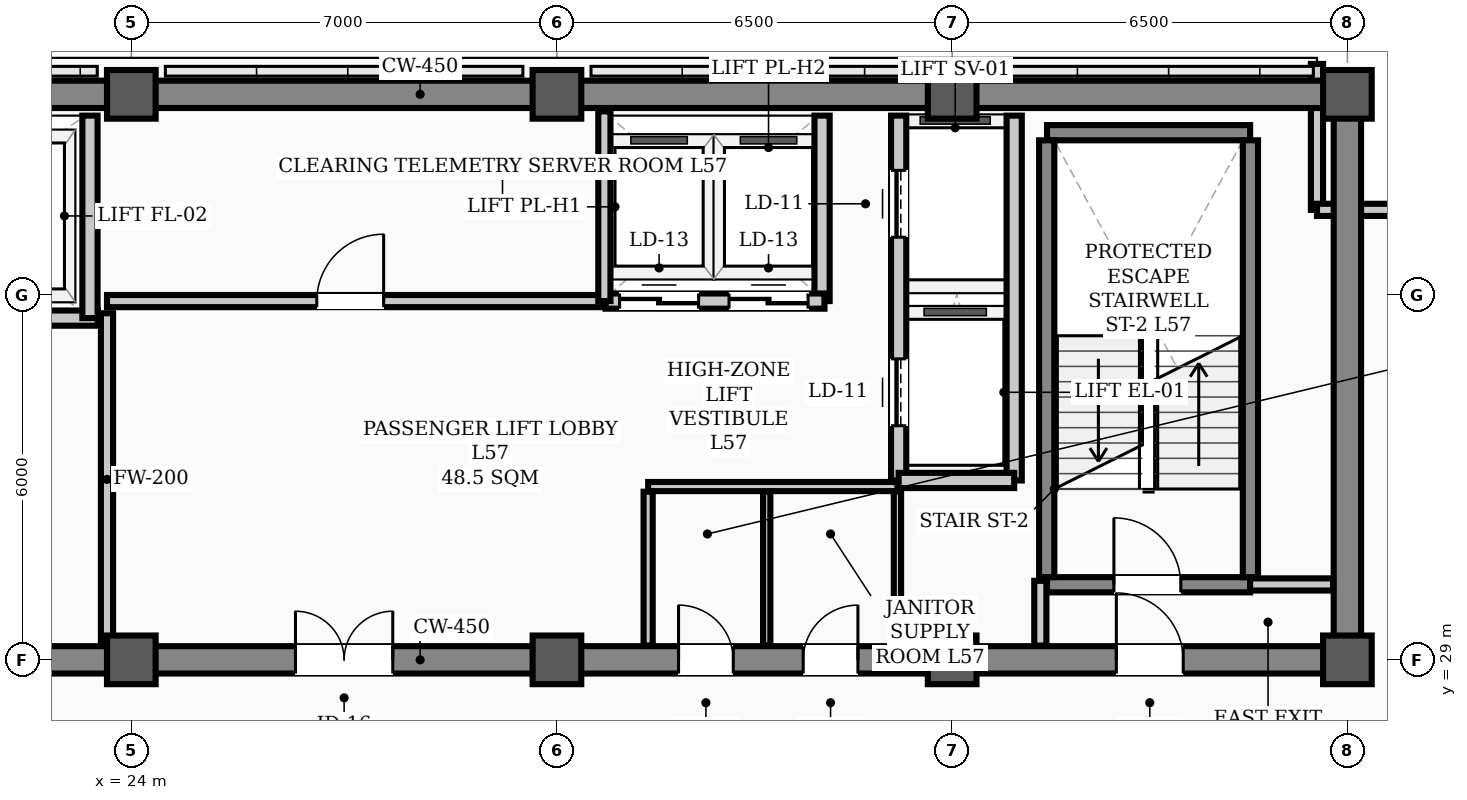
"""IFC4 building model, lengths in metres.
Left out: names, types, materials, properties, quantities, classifications, styles, units other than length and angle.
Written with IfcOpenShell. Run it as: python <this file> out.ifc"""

import sys

from ifc_helpers import new_model, si_unit, direction, frame, frame_2d, origin, origin_2d, place, context, subcontext, project, spatial, rectangle, hollow_rectangle, extrude, element, fill, save


model = new_model("IFC4")
c1 = context("Model", 3, precision=1e-05, world=origin(), true_north=direction((0.0, 1.0)))
c2 = subcontext(c1, "Body", "Model", "MODEL_VIEW")
j1 = project(units=[si_unit("LENGTHUNIT", "METRE"), si_unit("PLANEANGLEUNIT", "RADIAN")], contexts=[c1])
p1 = place(None, origin())
s1 = spatial("IfcSite", under=j1, at=p1, CompositionType="ELEMENT")
p2 = place(p1, origin())
s2 = spatial("IfcBuilding", under=s1, at=p2, CompositionType="ELEMENT")
p3 = place(p2, frame((0.0, 0.0, 230.6)))
s3 = spatial("IfcBuildingStorey", under=s2, at=p3, CompositionType="ELEMENT", Elevation=230.6)
for number, where, z_axis, x_axis in (
    (1, (24.0, 29.0, 0.0), (0.0, 0.0, 1.0), (1.0, 0.0, 0.0)),
    (2, (24.0, 38.3, 0.0), (0.0, 0.0, 1.0), (1.0, 0.0, 0.0)),
    (3, (31.0, 29.0, 0.0), (0.0, 0.0, 1.0), (1.0, 0.0, 0.0)),
    (4, (31.0, 38.3, 0.0), (0.0, 0.0, 1.0), (1.0, 0.0, 0.0)),
    (5, (37.5, 29.0, 0.0), (0.0, 0.0, 1.0), (1.0, 0.0, 0.0)),
    (6, (37.5, 38.3, 0.0), (0.0, 0.0, 1.0), (1.0, 0.0, 0.0)),
    (7, (44.0, 29.0, 0.0), (0.0, 0.0, 1.0), (1.0, 0.0, 0.0)),
    (8, (44.0, 38.3, 0.0), (0.0, 0.0, 1.0), (1.0, 0.0, 0.0)),
):
    element("IfcColumn", number, at=place(p3, frame(where, z_axis=z_axis, x_axis=x_axis)), inside=s3, PredefinedType="COLUMN", context=c2, shape_type="SweptSolid", body=[
        extrude(hollow_rectangle(XDim=0.8, YDim=0.8, WallThickness=0.032, InnerFilletRadius=0.016, OuterFilletRadius=0.048, at=origin_2d()), origin(), (0.0, 0.0, 1.0), 3.9),
    ])
p4 = place(p3, frame((43.5, 38.8, 0.0), z_axis=(0.0, 0.0, 1.0), x_axis=(0.0, -1.0, 0.0)))
e9 = element("IfcWall", 9, at=p4, inside=s3, PredefinedType="PARAPET", context=c2, shape_type="SweptSolid", body=[
    extrude(rectangle(XDim=2.4, YDim=0.2, at=frame_2d((1.2, 0.0))), origin(), (0.0, 0.0, 1.0), 1.2),
])
p5 = place(p3, frame((43.5, 36.4, 0.0), z_axis=(0.0, 0.0, 1.0), x_axis=(1.0, 0.0, 0.0)))
e10 = element("IfcWall", 10, at=p5, inside=s3, PredefinedType="PARAPET", context=c2, shape_type="SweptSolid", body=[
    extrude(rectangle(XDim=2.4, YDim=0.2, at=frame_2d((1.2, 0.0))), origin(), (0.0, 0.0, 1.0), 1.2),
])
p6 = place(p3, frame((13.5, 29.0, 0.0), z_axis=(0.0, 0.0, 1.0), x_axis=(1.0, 0.0, 0.0)))
e11 = element("IfcWall", 11, at=p6, inside=s3, PredefinedType="SHEAR", context=c2, shape_type="SweptSolid", body=[
    extrude(rectangle(XDim=30.5, YDim=0.45, at=frame_2d((15.25, 0.0))), origin(), (0.0, 0.0, 1.0), 3.72),
])
p7 = place(p6, frame((1.75, 0.0, 0.0)))
e12 = element("IfcOpeningElement", 12, at=p7, cuts=e11, PredefinedType="OPENING", context=c2, shape_type="SweptSolid", body=[
    extrude(rectangle(XDim=1.1, YDim=2.08, at=frame_2d((0.55, 1.04))), frame((0.0, 0.235, 0.0), z_axis=(0.0, -1.0, 0.0), x_axis=(1.0, 0.0, 0.0)), (0.0, 0.0, 1.0), 0.47),
])
p8 = place(p6, frame((26.7, 0.0, 0.0)))
e13 = element("IfcOpeningElement", 13, at=p8, cuts=e11, PredefinedType="OPENING", context=c2, shape_type="SweptSolid", body=[
    extrude(rectangle(XDim=1.1, YDim=2.08, at=frame_2d((0.55, 1.04))), frame((0.0, 0.235, 0.0), z_axis=(0.0, -1.0, 0.0), x_axis=(1.0, 0.0, 0.0)), (0.0, 0.0, 1.0), 0.47),
])
p9 = place(p6, frame((6.8, 0.0, 0.0)))
e14 = element("IfcOpeningElement", 14, at=p9, cuts=e11, PredefinedType="OPENING", context=c2, shape_type="SweptSolid", body=[
    extrude(rectangle(XDim=1.1, YDim=2.08, at=frame_2d((0.55, 1.04))), frame((0.0, 0.235, 0.0), z_axis=(0.0, -1.0, 0.0), x_axis=(1.0, 0.0, 0.0)), (0.0, 0.0, 1.0), 0.47),
])
p10 = place(p6, frame((13.2, 0.0, 0.0)))
e15 = element("IfcOpeningElement", 15, at=p10, cuts=e11, PredefinedType="OPENING", context=c2, shape_type="SweptSolid", body=[
    extrude(rectangle(XDim=1.6, YDim=2.08, at=frame_2d((0.8, 1.04))), frame((0.0, 0.235, 0.0), z_axis=(0.0, -1.0, 0.0), x_axis=(1.0, 0.0, 0.0)), (0.0, 0.0, 1.0), 0.47),
])
p11 = place(p6, frame((19.5, 0.0, 0.0)))
e16 = element("IfcOpeningElement", 16, at=p11, cuts=e11, PredefinedType="OPENING", context=c2, shape_type="SweptSolid", body=[
    extrude(rectangle(XDim=0.9, YDim=2.08, at=frame_2d((0.45, 1.04))), frame((0.0, 0.235, 0.0), z_axis=(0.0, -1.0, 0.0), x_axis=(1.0, 0.0, 0.0)), (0.0, 0.0, 1.0), 0.47),
])
p12 = place(p6, frame((21.55, 0.0, 0.0)))
e17 = element("IfcOpeningElement", 17, at=p12, cuts=e11, PredefinedType="OPENING", context=c2, shape_type="SweptSolid", body=[
    extrude(rectangle(XDim=0.9, YDim=2.08, at=frame_2d((0.45, 1.04))), frame((0.0, 0.235, 0.0), z_axis=(0.0, -1.0, 0.0), x_axis=(1.0, 0.0, 0.0)), (0.0, 0.0, 1.0), 0.47),
])
p13 = place(p3, frame((13.5, 38.3, 0.0), z_axis=(0.0, 0.0, 1.0), x_axis=(1.0, 0.0, 0.0)))
e18 = element("IfcWall", 18, at=p13, inside=s3, PredefinedType="SHEAR", context=c2, shape_type="SweptSolid", body=[
    extrude(rectangle(XDim=30.5, YDim=0.45, at=frame_2d((15.25, 0.0))), origin(), (0.0, 0.0, 1.0), 3.72),
])
p14 = place(p3, frame((44.0, 29.35, 0.0), z_axis=(0.0, 0.0, 1.0), x_axis=(0.0, 1.0, 0.0)))
e19 = element("IfcWall", 19, at=p14, inside=s3, PredefinedType="SHEAR", context=c2, shape_type="SweptSolid", body=[
    extrude(rectangle(XDim=8.6, YDim=0.45, at=frame_2d((4.3, 0.0))), origin(), (0.0, 0.0, 1.0), 3.72),
])
p15 = place(p3, frame((39.06, 30.235, 0.0), z_axis=(0.0, 0.0, 1.0), x_axis=(1.0, 0.0, 0.0)))
e20 = element("IfcWall", 20, at=p15, inside=s3, PredefinedType="STANDARD", context=c2, shape_type="SweptSolid", body=[
    extrude(rectangle(XDim=3.34, YDim=0.25, at=frame_2d((1.67, 0.0))), origin(), (0.0, 0.0, 1.0), 3.72),
])
p16 = place(p15, frame((1.1, 0.0, 0.0)))
e21 = element("IfcOpeningElement", 21, at=p16, cuts=e20, PredefinedType="OPENING", context=c2, shape_type="SweptSolid", body=[
    extrude(rectangle(XDim=1.1, YDim=2.08, at=frame_2d((0.55, 1.04))), frame((0.0, 0.135, 0.0), z_axis=(0.0, -1.0, 0.0), x_axis=(1.0, 0.0, 0.0)), (0.0, 0.0, 1.0), 0.27),
])
p17 = place(p3, frame((39.06, 37.669, 0.0), z_axis=(0.0, 0.0, 1.0), x_axis=(1.0, 0.0, 0.0)))
e22 = element("IfcWall", 22, at=p17, inside=s3, PredefinedType="STANDARD", context=c2, shape_type="SweptSolid", body=[
    extrude(rectangle(XDim=3.34, YDim=0.25, at=frame_2d((1.67, 0.0))), origin(), (0.0, 0.0, 1.0), 3.72),
])
for number, where, z_axis, x_axis in (
    (23, (39.055, 30.36, 0.0), (0.0, 0.0, 1.0), (0.0, 1.0, 0.0)),
    (24, (42.405, 30.36, 0.0), (0.0, 0.0, 1.0), (0.0, 1.0, 0.0)),
):
    element("IfcWall", number, at=place(p3, frame(where, z_axis=z_axis, x_axis=x_axis)), inside=s3, PredefinedType="STANDARD", context=c2, shape_type="SweptSolid", body=[
        extrude(rectangle(XDim=7.184, YDim=0.25, at=frame_2d((3.592, 0.0))), origin(), (0.0, 0.0, 1.0), 3.72),
    ])
p18 = place(p3, frame((18.1, 34.62, 0.0), z_axis=(0.0, 0.0, 1.0), x_axis=(1.0, 0.0, 0.0)))
e25 = element("IfcWall", 25, at=p18, inside=s3, PredefinedType="STANDARD", context=c2, shape_type="SweptSolid", body=[
    extrude(rectangle(XDim=5.35, YDim=0.25, at=frame_2d((2.675, 0.0))), origin(), (0.0, 0.0, 1.0), 3.72),
])
p19 = place(p18, frame((0.85, 0.0, 0.0)))
e26 = element("IfcOpeningElement", 26, at=p19, cuts=e25, PredefinedType="OPENING", context=c2, shape_type="SweptSolid", body=[
    extrude(rectangle(XDim=1.1, YDim=2.08, at=frame_2d((0.55, 1.04))), frame((0.0, 0.135, 0.0), z_axis=(0.0, -1.0, 0.0), x_axis=(1.0, 0.0, 0.0)), (0.0, 0.0, 1.0), 0.27),
])
p20 = place(p18, frame((3.45, 0.0, 0.0)))
e27 = element("IfcOpeningElement", 27, at=p20, cuts=e25, PredefinedType="OPENING", context=c2, shape_type="SweptSolid", body=[
    extrude(rectangle(XDim=1.1, YDim=2.08, at=frame_2d((0.55, 1.04))), frame((0.0, 0.135, 0.0), z_axis=(0.0, -1.0, 0.0), x_axis=(1.0, 0.0, 0.0)), (0.0, 0.0, 1.0), 0.27),
])
p21 = place(p3, frame((36.62, 31.95, 0.0), z_axis=(0.0, 0.0, 1.0), x_axis=(0.0, 1.0, 0.0)))
e28 = element("IfcWall", 28, at=p21, inside=s3, PredefinedType="STANDARD", context=c2, shape_type="SweptSolid", body=[
    extrude(rectangle(XDim=6.0, YDim=0.25, at=frame_2d((3.0, 0.0))), origin(), (0.0, 0.0, 1.0), 3.72),
])
p22 = place(p21, frame((0.9, 0.0, 0.0)))
e29 = element("IfcOpeningElement", 29, at=p22, cuts=e28, PredefinedType="OPENING", context=c2, shape_type="SweptSolid", body=[
    extrude(rectangle(XDim=1.1, YDim=2.08, at=frame_2d((0.55, 1.04))), frame((0.0, 0.135, 0.0), z_axis=(0.0, -1.0, 0.0), x_axis=(1.0, 0.0, 0.0)), (0.0, 0.0, 1.0), 0.27),
])
p23 = place(p21, frame((4.0, 0.0, 0.0)))
e30 = element("IfcOpeningElement", 30, at=p23, cuts=e28, PredefinedType="OPENING", context=c2, shape_type="SweptSolid", body=[
    extrude(rectangle(XDim=1.1, YDim=2.08, at=frame_2d((0.55, 1.04))), frame((0.0, 0.135, 0.0), z_axis=(0.0, -1.0, 0.0), x_axis=(1.0, 0.0, 0.0)), (0.0, 0.0, 1.0), 0.27),
])
p24 = place(p3, frame((38.52, 31.95, 0.0), z_axis=(0.0, 0.0, 1.0), x_axis=(0.0, 1.0, 0.0)))
e31 = element("IfcWall", 31, at=p24, inside=s3, PredefinedType="STANDARD", context=c2, shape_type="SweptSolid", body=[
    extrude(rectangle(XDim=6.0, YDim=0.25, at=frame_2d((3.0, 0.0))), origin(), (0.0, 0.0, 1.0), 3.48),
])
p25 = place(p3, frame((36.62, 31.95, 0.0), z_axis=(0.0, 0.0, 1.0), x_axis=(1.0, 0.0, 0.0)))
e32 = element("IfcWall", 32, at=p25, inside=s3, PredefinedType="STANDARD", context=c2, shape_type="SweptSolid", body=[
    extrude(rectangle(XDim=1.9, YDim=0.25, at=frame_2d((0.95, 0.0))), origin(), (0.0, 0.0, 1.0), 3.48),
])
p26 = place(p3, frame((23.32, 34.62, 0.0), z_axis=(0.0, 0.0, 1.0), x_axis=(0.0, 1.0, 0.0)))
e33 = element("IfcWall", 33, at=p26, inside=s3, PredefinedType="STANDARD", context=c2, shape_type="SweptSolid", body=[
    extrude(rectangle(XDim=3.33, YDim=0.25, at=frame_2d((1.665, 0.0))), origin(), (0.0, 0.0, 1.0), 3.72),
])
p27 = place(p3, frame((35.36, 34.9, 0.0), z_axis=(0.0, 0.0, 1.0), x_axis=(0.0, 1.0, 0.0)))
e34 = element("IfcWall", 34, at=p27, inside=s3, PredefinedType="STANDARD", context=c2, shape_type="SweptSolid", body=[
    extrude(rectangle(XDim=3.05, YDim=0.25, at=frame_2d((1.525, 0.0))), origin(), (0.0, 0.0, 1.0), 3.72),
])
p28 = place(p3, frame((31.8, 34.9, 0.0), z_axis=(0.0, 0.0, 1.0), x_axis=(1.0, 0.0, 0.0)))
e35 = element("IfcWall", 35, at=p28, inside=s3, PredefinedType="STANDARD", context=c2, shape_type="SweptSolid", body=[
    extrude(rectangle(XDim=3.6, YDim=0.25, at=frame_2d((1.8, 0.0))), origin(), (0.0, 0.0, 1.0), 3.72),
])
p29 = place(p28, frame((0.23, 0.0, 0.0)))
e36 = element("IfcOpeningElement", 36, at=p29, cuts=e35, PredefinedType="OPENING", context=c2, shape_type="SweptSolid", body=[
    extrude(rectangle(XDim=1.3, YDim=2.08, at=frame_2d((0.65, 1.04))), frame((0.0, 0.135, 0.0), z_axis=(0.0, -1.0, 0.0), x_axis=(1.0, 0.0, 0.0)), (0.0, 0.0, 1.0), 0.27),
])
p30 = place(p28, frame((2.03, 0.0, 0.0)))
e37 = element("IfcOpeningElement", 37, at=p30, cuts=e35, PredefinedType="OPENING", context=c2, shape_type="SweptSolid", body=[
    extrude(rectangle(XDim=1.3, YDim=2.08, at=frame_2d((0.65, 1.04))), frame((0.0, 0.135, 0.0), z_axis=(0.0, -1.0, 0.0), x_axis=(1.0, 0.0, 0.0)), (0.0, 0.0, 1.0), 0.27),
])
p31 = place(p3, frame((42.4, 30.24, 0.0), z_axis=(0.0, 0.0, 1.0), x_axis=(1.0, 0.0, 0.0)))
e38 = element("IfcWall", 38, at=p31, inside=s3, PredefinedType="STANDARD", context=c2, shape_type="SweptSolid", body=[
    extrude(rectangle(XDim=1.365, YDim=0.2, at=frame_2d((0.683, 0.0))), origin(), (0.0, 0.0, 1.0), 3.72),
])
p32 = place(p3, frame((23.6, 34.9, 0.0), z_axis=(0.0, 0.0, 1.0), x_axis=(1.0, 0.0, 0.0)))
e39 = element("IfcWall", 39, at=p32, inside=s3, PredefinedType="STANDARD", context=c2, shape_type="SweptSolid", body=[
    extrude(rectangle(XDim=8.18, YDim=0.2, at=frame_2d((4.09, 0.0))), origin(), (0.0, 0.0, 1.0), 3.72),
])
p33 = place(p32, frame((3.45, 0.0, 0.0)))
e40 = element("IfcOpeningElement", 40, at=p33, cuts=e39, PredefinedType="OPENING", context=c2, shape_type="SweptSolid", body=[
    extrude(rectangle(XDim=1.1, YDim=2.08, at=frame_2d((0.55, 1.04))), frame((0.0, 0.11, 0.0), z_axis=(0.0, -1.0, 0.0), x_axis=(1.0, 0.0, 0.0)), (0.0, 0.0, 1.0), 0.22),
])
p34 = place(p3, frame((32.5, 31.85, 0.0), z_axis=(0.0, 0.0, 1.0), x_axis=(1.0, 0.0, 0.0)))
e41 = element("IfcWall", 41, at=p34, inside=s3, PredefinedType="PARTITIONING", context=c2, shape_type="SweptSolid", body=[
    extrude(rectangle(XDim=4.1, YDim=0.15, at=frame_2d((2.05, 0.0))), origin(), (0.0, 0.0, 1.0), 3.72),
])
p35 = place(p3, frame((38.95, 29.235, 0.0), z_axis=(0.0, 0.0, 1.0), x_axis=(0.0, 1.0, 0.0)))
e42 = element("IfcWall", 42, at=p35, inside=s3, PredefinedType="STANDARD", context=c2, shape_type="SweptSolid", body=[
    extrude(rectangle(XDim=1.065, YDim=0.2, at=frame_2d((0.532, 0.0))), origin(), (0.0, 0.0, 1.0), 3.72),
])
p36 = place(p3, frame((23.6, 29.235, 0.0), z_axis=(0.0, 0.0, 1.0), x_axis=(0.0, 1.0, 0.0)))
e43 = element("IfcWall", 43, at=p36, inside=s3, PredefinedType="STANDARD", context=c2, shape_type="SweptSolid", body=[
    extrude(rectangle(XDim=5.465, YDim=0.2, at=frame_2d((2.732, 0.0))), origin(), (0.0, 0.0, 1.0), 3.2),
])
p37 = place(p3, frame((32.5, 29.235, 0.0), z_axis=(0.0, 0.0, 1.0), x_axis=(0.0, 1.0, 0.0)))
e44 = element("IfcWall", 44, at=p37, inside=s3, PredefinedType="PARTITIONING", context=c2, shape_type="SweptSolid", body=[
    extrude(rectangle(XDim=2.53, YDim=0.15, at=frame_2d((1.265, 0.0))), origin(), (0.0, 0.0, 1.0), 3.35),
])
for number, where, z_axis, x_axis in (
    (45, (36.6, 29.235, 0.0), (0.0, 0.0, 1.0), (0.0, 1.0, 0.0)),
    (46, (34.45, 29.235, 0.0), (0.0, 0.0, 1.0), (0.0, 1.0, 0.0)),
):
    element("IfcWall", number, at=place(p3, frame(where, z_axis=z_axis, x_axis=x_axis)), inside=s3, PredefinedType="PARTITIONING", context=c2, shape_type="SweptSolid", body=[
        extrude(rectangle(XDim=2.53, YDim=0.12, at=frame_2d((1.265, 0.0))), origin(), (0.0, 0.0, 1.0), 3.35),
    ])
p38 = place(p3, frame((31.78, 34.9, 0.0), z_axis=(0.0, 0.0, 1.0), x_axis=(0.0, 1.0, 0.0)))
e47 = element("IfcWall", 47, at=p38, inside=s3, PredefinedType="STANDARD", context=c2, shape_type="SweptSolid", body=[
    extrude(rectangle(XDim=3.12, YDim=0.2, at=frame_2d((1.56, 0.0))), origin(), (0.0, 0.0, 1.0), 3.72),
])
p39 = place(p16, origin())
e48 = element("IfcDoor", 48, at=p39, inside=s3, OperationType="SINGLE_SWING_LEFT", PredefinedType="DOOR", context=c2, shape_type="SweptSolid", body=[
    extrude(rectangle(XDim=1.1, YDim=2.08, at=frame_2d((0.55, 1.04))), frame((0.0, 0.025, 0.0), z_axis=(0.0, -1.0, 0.0), x_axis=(1.0, 0.0, 0.0)), (0.0, 0.0, 1.0), 0.05),
])
fill(e21, e48)
p40 = place(p8, origin())
e49 = element("IfcDoor", 49, at=p40, inside=s3, OperationType="SINGLE_SWING_LEFT", PredefinedType="DOOR", context=c2, shape_type="SweptSolid", body=[
    extrude(rectangle(XDim=1.1, YDim=2.08, at=frame_2d((0.55, 1.04))), frame((0.0, 0.025, 0.0), z_axis=(0.0, -1.0, 0.0), x_axis=(1.0, 0.0, 0.0)), (0.0, 0.0, 1.0), 0.05),
])
fill(e13, e49)
p41 = place(p10, origin())
e50 = element("IfcDoor", 50, at=p41, inside=s3, OperationType="DOUBLE_DOOR_SINGLE_SWING", PredefinedType="DOOR", context=c2, shape_type="SweptSolid", body=[
    extrude(rectangle(XDim=1.6, YDim=2.08, at=frame_2d((0.8, 1.04))), frame((0.0, 0.025, 0.0), z_axis=(0.0, -1.0, 0.0), x_axis=(1.0, 0.0, 0.0)), (0.0, 0.0, 1.0), 0.05),
])
fill(e15, e50)
p42 = place(p33, origin())
e51 = element("IfcDoor", 51, at=p42, inside=s3, OperationType="SINGLE_SWING_RIGHT", PredefinedType="DOOR", context=c2, shape_type="SweptSolid", body=[
    extrude(rectangle(XDim=1.1, YDim=2.08, at=frame_2d((0.55, 1.04))), frame((0.0, 0.025, 0.0), z_axis=(0.0, -1.0, 0.0), x_axis=(1.0, 0.0, 0.0)), (0.0, 0.0, 1.0), 0.05),
])
fill(e40, e51)
p43 = place(p11, origin())
e52 = element("IfcDoor", 52, at=p43, inside=s3, OperationType="SINGLE_SWING_LEFT", PredefinedType="DOOR", context=c2, shape_type="SweptSolid", body=[
    extrude(rectangle(XDim=0.9, YDim=2.08, at=frame_2d((0.45, 1.04))), frame((0.0, 0.025, 0.0), z_axis=(0.0, -1.0, 0.0), x_axis=(1.0, 0.0, 0.0)), (0.0, 0.0, 1.0), 0.05),
])
fill(e16, e52)
p44 = place(p12, origin())
e53 = element("IfcDoor", 53, at=p44, inside=s3, OperationType="SINGLE_SWING_RIGHT", PredefinedType="DOOR", context=c2, shape_type="SweptSolid", body=[
    extrude(rectangle(XDim=0.9, YDim=2.08, at=frame_2d((0.45, 1.04))), frame((0.0, 0.025, 0.0), z_axis=(0.0, -1.0, 0.0), x_axis=(1.0, 0.0, 0.0)), (0.0, 0.0, 1.0), 0.05),
])
fill(e17, e53)
p45 = place(p22, origin())
e54 = element("IfcDoor", 54, at=p45, inside=s3, OperationType="SLIDING_TO_LEFT", PredefinedType="DOOR", context=c2, shape_type="SweptSolid", body=[
    extrude(rectangle(XDim=1.1, YDim=2.08, at=frame_2d((0.55, 1.04))), frame((0.0, 0.025, 0.0), z_axis=(0.0, -1.0, 0.0), x_axis=(1.0, 0.0, 0.0)), (0.0, 0.0, 1.0), 0.05),
])
fill(e29, e54)
p46 = place(p23, origin())
e55 = element("IfcDoor", 55, at=p46, inside=s3, OperationType="SLIDING_TO_LEFT", PredefinedType="DOOR", context=c2, shape_type="SweptSolid", body=[
    extrude(rectangle(XDim=1.1, YDim=2.08, at=frame_2d((0.55, 1.04))), frame((0.0, 0.025, 0.0), z_axis=(0.0, -1.0, 0.0), x_axis=(1.0, 0.0, 0.0)), (0.0, 0.0, 1.0), 0.05),
])
fill(e30, e55)
p47 = place(p29, origin())
e56 = element("IfcDoor", 56, at=p47, inside=s3, OperationType="DOUBLE_DOOR_SLIDING", PredefinedType="DOOR", context=c2, shape_type="SweptSolid", body=[
    extrude(rectangle(XDim=1.3, YDim=2.08, at=frame_2d((0.65, 1.04))), frame((0.0, 0.025, 0.0), z_axis=(0.0, -1.0, 0.0), x_axis=(1.0, 0.0, 0.0)), (0.0, 0.0, 1.0), 0.05),
])
fill(e36, e56)
p48 = place(p30, origin())
e57 = element("IfcDoor", 57, at=p48, inside=s3, OperationType="DOUBLE_DOOR_SLIDING", PredefinedType="DOOR", context=c2, shape_type="SweptSolid", body=[
    extrude(rectangle(XDim=1.3, YDim=2.08, at=frame_2d((0.65, 1.04))), frame((0.0, 0.025, 0.0), z_axis=(0.0, -1.0, 0.0), x_axis=(1.0, 0.0, 0.0)), (0.0, 0.0, 1.0), 0.05),
])
fill(e37, e57)
save(model, sys.argv[1])
